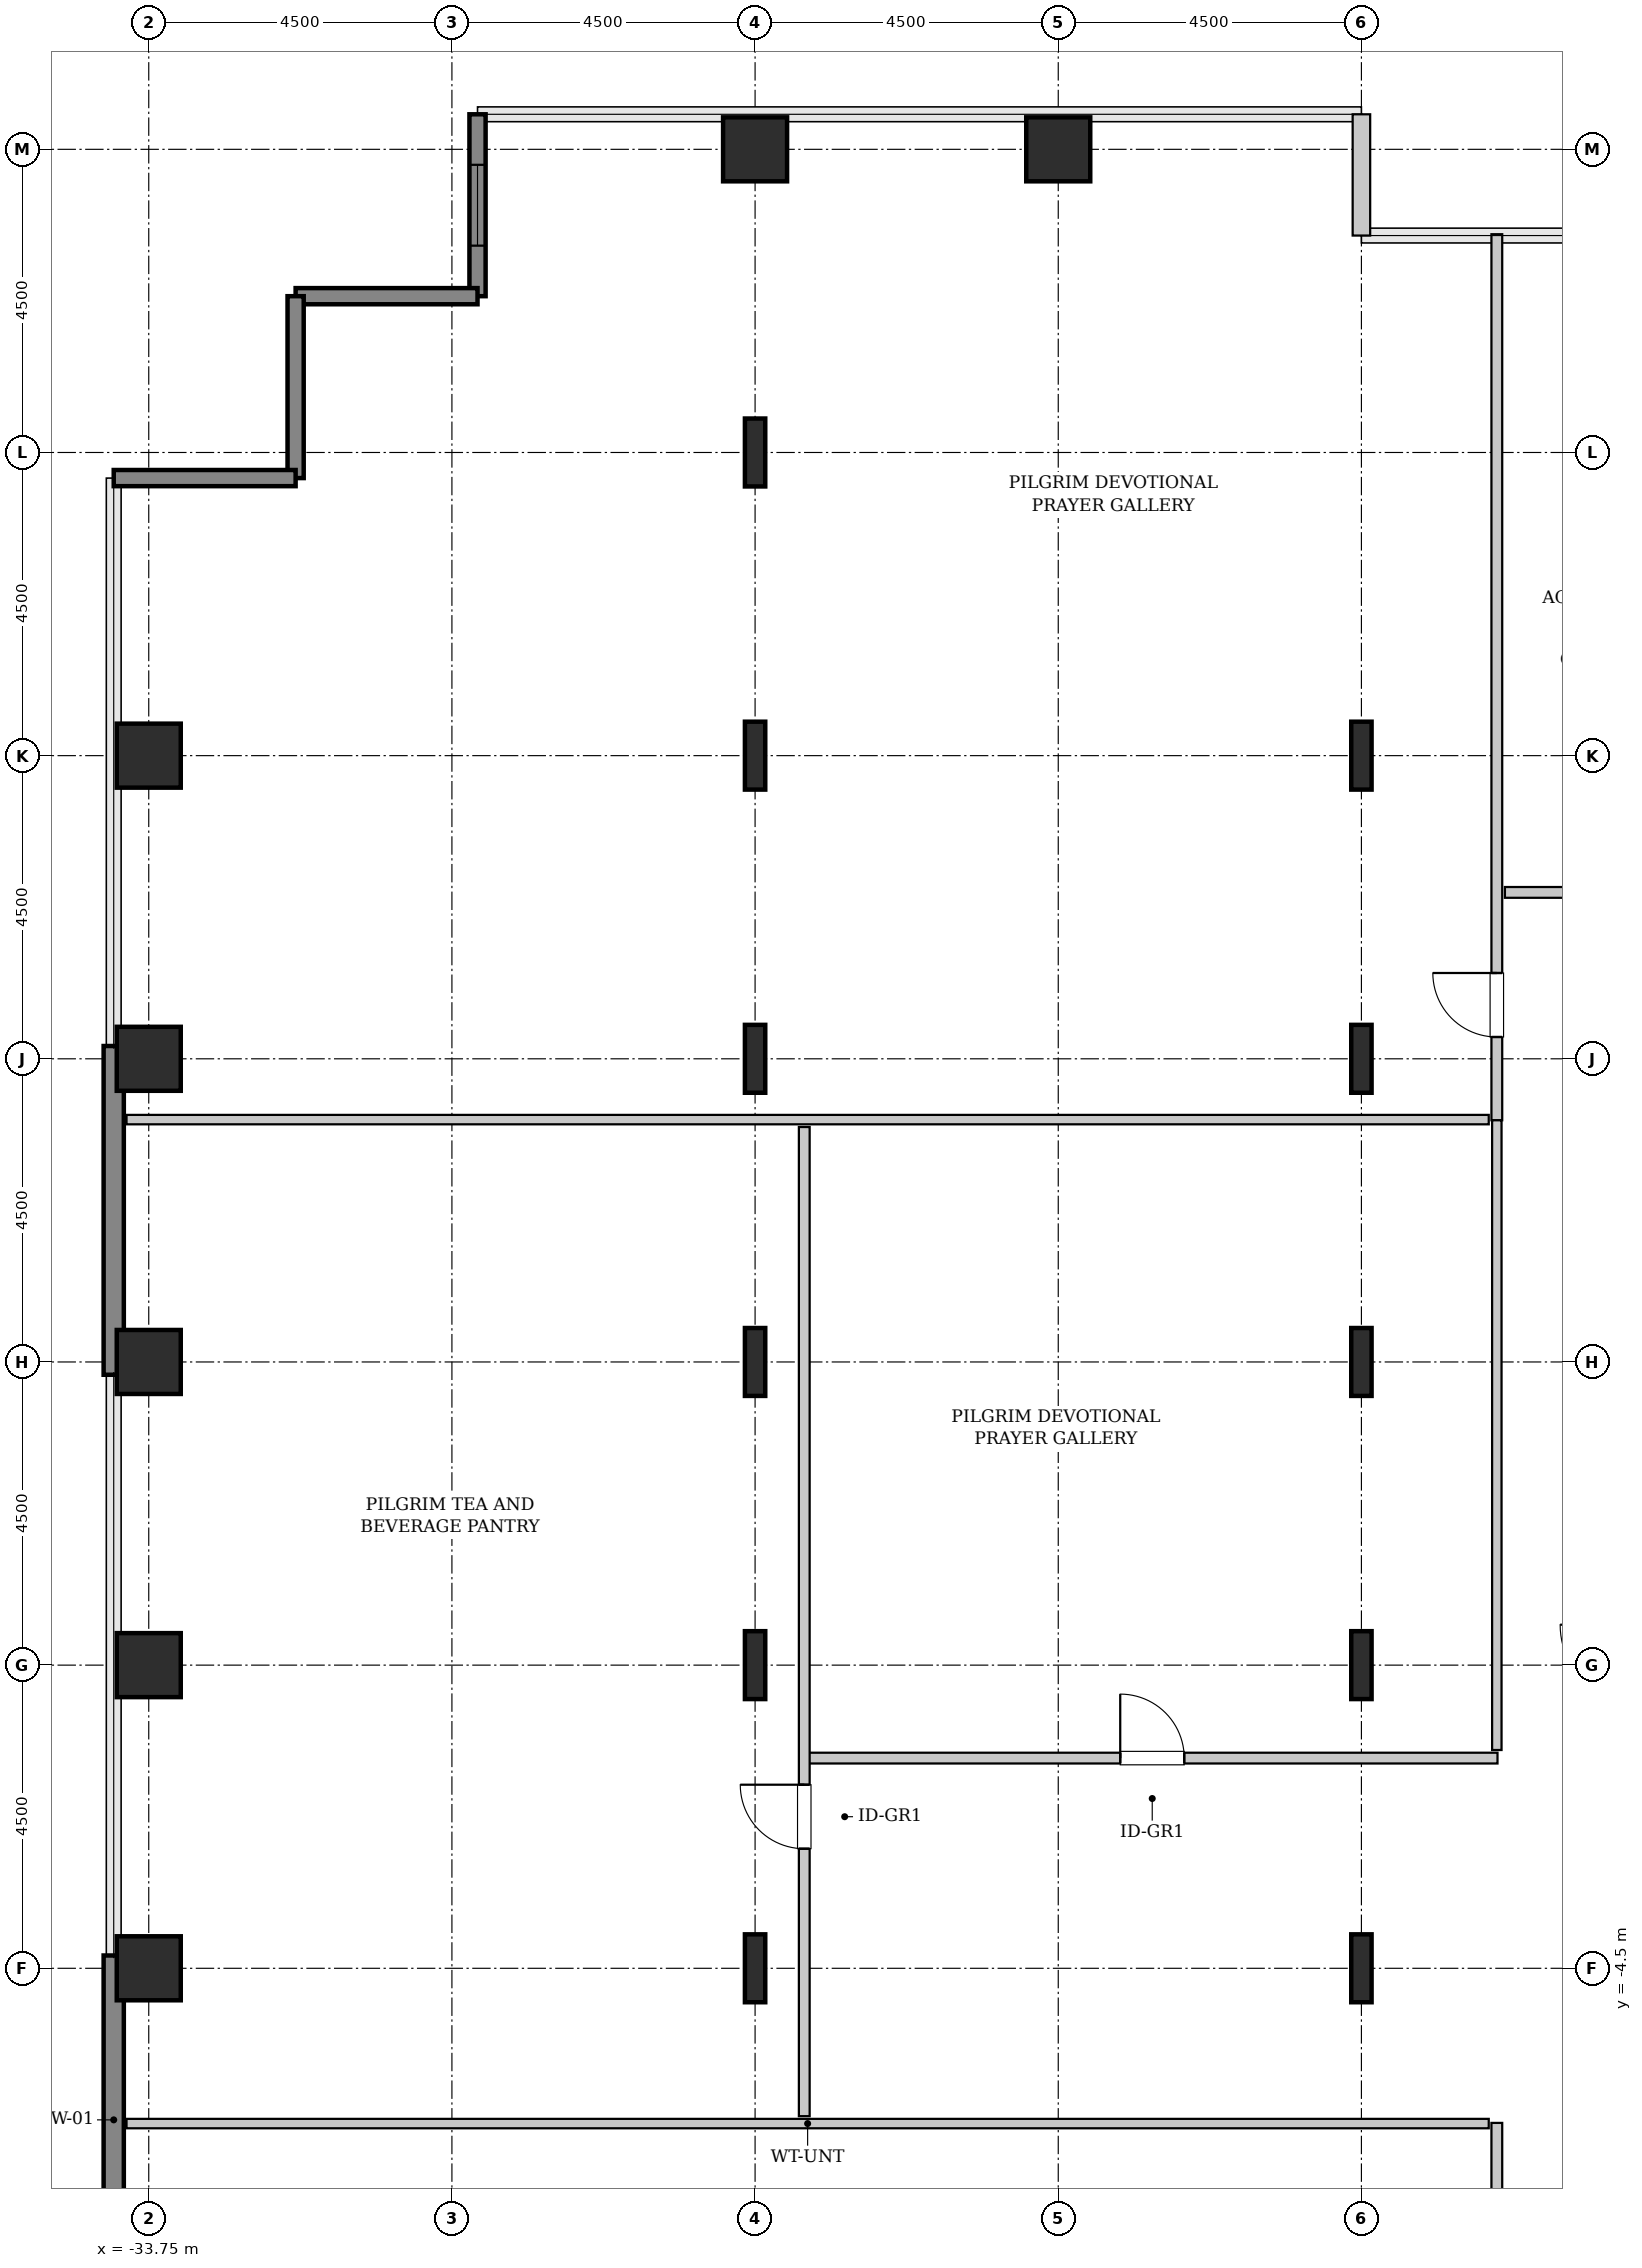
"""IFC4 building model, lengths in metres.
Left out: names, types, materials, properties, quantities, classifications, styles, units other than length and angle.
Written with IfcOpenShell. Run it as: python <this file> out.ifc"""

import sys

from ifc_helpers import new_model, si_unit, direction, frame, frame_2d, origin, origin_2d, place, context, subcontext, project, spatial, rectangle, hollow_rectangle, i_section, extrude, source, transform, mapped, element, fill, save


model = new_model("IFC4")
c1 = context("Model", 3, precision=1e-05, world=origin(), true_north=direction((0.0, 1.0)))
c2 = subcontext(c1, "Body", "Model", "MODEL_VIEW")
j1 = project(units=[si_unit("LENGTHUNIT", "METRE"), si_unit("PLANEANGLEUNIT", "RADIAN")], contexts=[c1])
p1 = place(None, origin())
s1 = spatial("IfcSite", under=j1, at=p1, CompositionType="ELEMENT")
p2 = place(p1, origin())
s2 = spatial("IfcBuilding", under=s1, at=p2, CompositionType="ELEMENT")
p3 = place(p2, frame((0.0, 0.0, 78.6)))
s3 = spatial("IfcBuildingStorey", under=s2, at=p3, CompositionType="ELEMENT", Elevation=78.6)
m1 = source(origin(), c2, "Body", "SweptSolid", [
    extrude(hollow_rectangle(XDim=0.95, YDim=0.95, WallThickness=0.045, InnerFilletRadius=0.045, OuterFilletRadius=0.09, at=origin_2d()), origin(), (0.0, 0.0, 1.0), 3.8),
])
for number, where, z_axis, x_axis in (
    (1, (-33.75, -4.5, 0.0), (0.0, 0.0, 1.0), (1.0, 0.0, 0.0)),
    (2, (-33.75, 0.0, 0.0), (0.0, 0.0, 1.0), (1.0, 0.0, 0.0)),
    (3, (-33.75, 4.5, 0.0), (0.0, 0.0, 1.0), (1.0, 0.0, 0.0)),
    (4, (-33.75, 9.0, 0.0), (0.0, 0.0, 1.0), (1.0, 0.0, 0.0)),
    (5, (-33.75, 13.5, 0.0), (0.0, 0.0, 1.0), (1.0, 0.0, 0.0)),
):
    element("IfcColumn", number, at=place(p3, frame(where, z_axis=z_axis, x_axis=x_axis)), inside=s3, PredefinedType="COLUMN", context=c2, shape_type="MappedRepresentation", body=[
        mapped(m1, transform((0.0, 0.0, 0.0), x_axis=(1.0, 0.0, 0.0), y_axis=(0.0, 1.0, 0.0), z_axis=(0.0, 0.0, 1.0), scale=1.0)),
    ])
m2 = source(origin(), c2, "Body", "SweptSolid", [
    extrude(i_section(OverallWidth=0.302, OverallDepth=1.008, WebThickness=0.021, FlangeThickness=0.04, FilletRadius=0.03, at=origin_2d()), origin(), (0.0, 0.0, 1.0), 3.8),
])
for number, where, z_axis, x_axis in (
    (6, (-24.75, -4.5, 0.0), (0.0, 0.0, 1.0), (1.0, 0.0, 0.0)),
    (7, (-24.75, 0.0, 0.0), (0.0, 0.0, 1.0), (1.0, 0.0, 0.0)),
    (8, (-24.75, 4.5, 0.0), (0.0, 0.0, 1.0), (1.0, 0.0, 0.0)),
    (9, (-24.75, 9.0, 0.0), (0.0, 0.0, 1.0), (1.0, 0.0, 0.0)),
    (10, (-24.75, 13.5, 0.0), (0.0, 0.0, 1.0), (1.0, 0.0, 0.0)),
    (11, (-24.75, 18.0, 0.0), (0.0, 0.0, 1.0), (1.0, 0.0, 0.0)),
):
    element("IfcColumn", number, at=place(p3, frame(where, z_axis=z_axis, x_axis=x_axis)), inside=s3, PredefinedType="COLUMN", context=c2, shape_type="MappedRepresentation", body=[
        mapped(m2, transform((0.0, 0.0, 0.0), x_axis=(1.0, 0.0, 0.0), y_axis=(0.0, 1.0, 0.0), z_axis=(0.0, 0.0, 1.0), scale=1.0)),
    ])
for number, where, z_axis, x_axis in (
    (12, (-24.75, 22.5, 0.0), (0.0, 0.0, 1.0), (1.0, 0.0, 0.0)),
    (13, (-20.25, 22.5, 0.0), (0.0, 0.0, 1.0), (1.0, 0.0, 0.0)),
):
    element("IfcColumn", number, at=place(p3, frame(where, z_axis=z_axis, x_axis=x_axis)), inside=s3, PredefinedType="COLUMN", context=c2, shape_type="MappedRepresentation", body=[
        mapped(m1, transform((0.0, 0.0, 0.0), x_axis=(1.0, 0.0, 0.0), y_axis=(0.0, 1.0, 0.0), z_axis=(0.0, 0.0, 1.0), scale=1.0)),
    ])
for number, where, z_axis, x_axis in (
    (14, (-15.75, -4.5, 0.0), (0.0, 0.0, 1.0), (1.0, 0.0, 0.0)),
    (15, (-15.75, 0.0, 0.0), (0.0, 0.0, 1.0), (1.0, 0.0, 0.0)),
    (16, (-15.75, 4.5, 0.0), (0.0, 0.0, 1.0), (1.0, 0.0, 0.0)),
    (17, (-15.75, 9.0, 0.0), (0.0, 0.0, 1.0), (1.0, 0.0, 0.0)),
    (18, (-15.75, 13.5, 0.0), (0.0, 0.0, 1.0), (1.0, 0.0, 0.0)),
):
    element("IfcColumn", number, at=place(p3, frame(where, z_axis=z_axis, x_axis=x_axis)), inside=s3, PredefinedType="COLUMN", context=c2, shape_type="MappedRepresentation", body=[
        mapped(m2, transform((0.0, 0.0, 0.0), x_axis=(1.0, 0.0, 0.0), y_axis=(0.0, 1.0, 0.0), z_axis=(0.0, 0.0, 1.0), scale=1.0)),
    ])
m3 = source(origin(), c2, "Body", "SweptSolid", [
    extrude(rectangle(XDim=4.88, YDim=0.3, at=frame_2d((2.44, 0.0))), origin(), (0.0, 0.0, 1.0), 3.55),
])
for number, where, z_axis, x_axis in (
    (19, (-34.27, -9.19, 0.0), (0.0, 0.0, 1.0), (0.0, 1.0, 0.0)),
    (20, (-34.27, 4.31, 0.0), (0.0, 0.0, 1.0), (0.0, 1.0, 0.0)),
):
    element("IfcWall", number, at=place(p3, frame(where, z_axis=z_axis, x_axis=x_axis)), inside=s3, PredefinedType="SHEAR", context=c2, shape_type="MappedRepresentation", body=[
        mapped(m3, transform((0.0, 0.0, 0.0), x_axis=(1.0, 0.0, 0.0), y_axis=(0.0, 1.0, 0.0), z_axis=(0.0, 0.0, 1.0), scale=1.0)),
    ])
m4 = source(origin(), c2, "Body", "SweptSolid", [
    extrude(rectangle(XDim=1.8, YDim=0.26, at=frame_2d((0.9, 0.0))), origin(), (0.0, 0.0, 1.0), 3.55),
])
p4 = place(p3, frame((-15.75, 21.22, 0.0), z_axis=(0.0, 0.0, 1.0), x_axis=(0.0, 1.0, 0.0)))
e21 = element("IfcWall", 21, at=p4, inside=s3, PredefinedType="SOLIDWALL", context=c2, shape_type="MappedRepresentation", body=[
    mapped(m4, transform((0.0, 0.0, 0.0), x_axis=(1.0, 0.0, 0.0), y_axis=(0.0, 1.0, 0.0), z_axis=(0.0, 0.0, 1.0), scale=1.0)),
])
m5 = source(origin(), c2, "Body", "SweptSolid", [
    extrude(rectangle(XDim=2.7, YDim=0.24, at=frame_2d((1.35, 0.0))), origin(), (0.0, 0.0, 1.0), 3.55),
])
p5 = place(p3, frame((-28.87, 23.02, 0.0), z_axis=(0.0, 0.0, 1.0), x_axis=(0.0, -1.0, 0.0)))
e22 = element("IfcWall", 22, at=p5, inside=s3, PredefinedType="SHEAR", context=c2, shape_type="MappedRepresentation", body=[
    mapped(m5, transform((0.0, 0.0, 0.0), x_axis=(1.0, 0.0, 0.0), y_axis=(0.0, 1.0, 0.0), z_axis=(0.0, 0.0, 1.0), scale=1.0)),
])
p6 = place(p5, frame((0.75, 0.0, 0.85)))
e23 = element("IfcOpeningElement", 23, at=p6, cuts=e22, PredefinedType="OPENING", context=c2, shape_type="SweptSolid", body=[
    extrude(rectangle(XDim=1.2, YDim=1.8, at=frame_2d((0.6, 0.9))), frame((0.0, 0.13, 0.0), z_axis=(0.0, -1.0, 0.0), x_axis=(1.0, 0.0, 0.0)), (0.0, 0.0, 1.0), 0.26),
])
for number, where, z_axis, x_axis in (
    (24, (-28.87, 20.32, 0.0), (0.0, 0.0, 1.0), (-1.0, 0.0, 0.0)),
    (25, (-31.57, 20.32, 0.0), (0.0, 0.0, 1.0), (0.0, -1.0, 0.0)),
    (26, (-31.57, 17.62, 0.0), (0.0, 0.0, 1.0), (-1.0, 0.0, 0.0)),
):
    element("IfcWall", number, at=place(p3, frame(where, z_axis=z_axis, x_axis=x_axis)), inside=s3, PredefinedType="SHEAR", context=c2, shape_type="MappedRepresentation", body=[
        mapped(m5, transform((0.0, 0.0, 0.0), x_axis=(1.0, 0.0, 0.0), y_axis=(0.0, 1.0, 0.0), z_axis=(0.0, 0.0, 1.0), scale=1.0)),
    ])
m6 = source(origin(), c2, "Body", "SweptSolid", [
    extrude(rectangle(XDim=14.445, YDim=0.16, at=frame_2d((7.223, 0.0))), origin(), (0.0, 0.0, 1.0), 3.535),
])
p7 = place(p3, frame((-13.74, -21.24, 0.0), z_axis=(0.0, 0.0, 1.0), x_axis=(0.0, 1.0, 0.0)))
e27 = element("IfcWall", 27, at=p7, inside=s3, PredefinedType="PARTITIONING", context=c2, shape_type="MappedRepresentation", body=[
    mapped(m6, transform((0.0, 0.0, 0.0), x_axis=(1.0, 0.0, 0.0), y_axis=(0.0, 1.0, 0.0), z_axis=(0.0, 0.0, 1.0), scale=1.0)),
])
p8 = place(p7, frame((11.613, 0.0, 0.0)))
e28 = element("IfcOpeningElement", 28, at=p8, cuts=e27, PredefinedType="OPENING", context=c2, shape_type="SweptSolid", body=[
    extrude(rectangle(XDim=0.95, YDim=2.1, at=frame_2d((0.475, 1.05))), frame((0.0, 0.09, 0.0), z_axis=(0.0, -1.0, 0.0), x_axis=(1.0, 0.0, 0.0)), (0.0, 0.0, 1.0), 0.18),
])
m7 = source(origin(), c2, "Body", "SweptSolid", [
    extrude(rectangle(XDim=20.22, YDim=0.14, at=frame_2d((10.11, 0.0))), origin(), (0.0, 0.0, 1.0), 3.535),
])
p9 = place(p3, frame((-34.08, -6.805, 0.0), z_axis=(0.0, 0.0, 1.0), x_axis=(1.0, 0.0, 0.0)))
e29 = element("IfcWall", 29, at=p9, inside=s3, PredefinedType="PARTITIONING", context=c2, shape_type="MappedRepresentation", body=[
    mapped(m7, transform((0.0, 0.0, 0.0), x_axis=(1.0, 0.0, 0.0), y_axis=(0.0, 1.0, 0.0), z_axis=(0.0, 0.0, 1.0), scale=1.0)),
])
m8 = source(origin(), c2, "Body", "SweptSolid", [
    extrude(rectangle(XDim=13.153, YDim=0.16, at=frame_2d((6.576, 0.0))), origin(), (0.0, 0.0, 1.0), 3.535),
])
p10 = place(p3, frame((-13.74, 8.087, 0.0), z_axis=(0.0, 0.0, 1.0), x_axis=(0.0, 1.0, 0.0)))
e30 = element("IfcWall", 30, at=p10, inside=s3, PredefinedType="PARTITIONING", context=c2, shape_type="MappedRepresentation", body=[
    mapped(m8, transform((0.0, 0.0, 0.0), x_axis=(1.0, 0.0, 0.0), y_axis=(0.0, 1.0, 0.0), z_axis=(0.0, 0.0, 1.0), scale=1.0)),
])
p11 = place(p10, frame((1.236, 0.0, 0.0)))
e31 = element("IfcOpeningElement", 31, at=p11, cuts=e30, PredefinedType="OPENING", context=c2, shape_type="SweptSolid", body=[
    extrude(rectangle(XDim=0.95, YDim=2.1, at=frame_2d((0.475, 1.05))), frame((0.0, 0.09, 0.0), z_axis=(0.0, -1.0, 0.0), x_axis=(1.0, 0.0, 0.0)), (0.0, 0.0, 1.0), 0.18),
])
p12 = place(p3, frame((-34.08, 8.097, 0.0), z_axis=(0.0, 0.0, 1.0), x_axis=(1.0, 0.0, 0.0)))
e32 = element("IfcWall", 32, at=p12, inside=s3, PredefinedType="PARTITIONING", context=c2, shape_type="MappedRepresentation", body=[
    mapped(m7, transform((0.0, 0.0, 0.0), x_axis=(1.0, 0.0, 0.0), y_axis=(0.0, 1.0, 0.0), z_axis=(0.0, 0.0, 1.0), scale=1.0)),
])
m9 = source(origin(), c2, "Body", "SweptSolid", [
    extrude(rectangle(XDim=10.25, YDim=0.16, at=frame_2d((5.125, 0.0))), origin(), (0.0, 0.0, 1.0), 3.535),
])
p13 = place(p3, frame((-23.98, -1.38, 0.0), z_axis=(0.0, 0.0, 1.0), x_axis=(1.0, 0.0, 0.0)))
e33 = element("IfcWall", 33, at=p13, inside=s3, PredefinedType="PARTITIONING", context=c2, shape_type="MappedRepresentation", body=[
    mapped(m9, transform((0.0, 0.0, 0.0), x_axis=(1.0, 0.0, 0.0), y_axis=(0.0, 1.0, 0.0), z_axis=(0.0, 0.0, 1.0), scale=1.0)),
])
p14 = place(p13, frame((4.65, 0.0, 0.0)))
e34 = element("IfcOpeningElement", 34, at=p14, cuts=e33, PredefinedType="OPENING", context=c2, shape_type="SweptSolid", body=[
    extrude(rectangle(XDim=0.95, YDim=2.1, at=frame_2d((0.475, 1.05))), frame((0.0, 0.09, 0.0), z_axis=(0.0, -1.0, 0.0), x_axis=(1.0, 0.0, 0.0)), (0.0, 0.0, 1.0), 0.18),
])
m10 = source(origin(), c2, "Body", "SweptSolid", [
    extrude(rectangle(XDim=9.347, YDim=0.14, at=frame_2d((4.674, 0.0))), origin(), (0.0, 0.0, 1.0), 3.535),
])
p15 = place(p3, frame((-13.74, -1.26, 0.0), z_axis=(0.0, 0.0, 1.0), x_axis=(0.0, 1.0, 0.0)))
e35 = element("IfcWall", 35, at=p15, inside=s3, PredefinedType="PARTITIONING", context=c2, shape_type="MappedRepresentation", body=[
    mapped(m10, transform((0.0, 0.0, 0.0), x_axis=(1.0, 0.0, 0.0), y_axis=(0.0, 1.0, 0.0), z_axis=(0.0, 0.0, 1.0), scale=1.0)),
])
m11 = source(origin(), c2, "Body", "SweptSolid", [
    extrude(rectangle(XDim=14.683, YDim=0.16, at=frame_2d((7.341, 0.0))), origin(), (0.0, 0.0, 1.0), 3.535),
])
p16 = place(p3, frame((-24.02, -6.695, 0.0), z_axis=(0.0, 0.0, 1.0), x_axis=(0.0, 1.0, 0.0)))
e36 = element("IfcWall", 36, at=p16, inside=s3, PredefinedType="PARTITIONING", context=c2, shape_type="MappedRepresentation", body=[
    mapped(m11, transform((0.0, 0.0, 0.0), x_axis=(1.0, 0.0, 0.0), y_axis=(0.0, 1.0, 0.0), z_axis=(0.0, 0.0, 1.0), scale=1.0)),
])
p17 = place(p16, frame((3.97, 0.0, 0.0)))
e37 = element("IfcOpeningElement", 37, at=p17, cuts=e36, PredefinedType="OPENING", context=c2, shape_type="SweptSolid", body=[
    extrude(rectangle(XDim=0.95, YDim=2.1, at=frame_2d((0.475, 1.05))), frame((0.0, 0.09, 0.0), z_axis=(0.0, -1.0, 0.0), x_axis=(1.0, 0.0, 0.0)), (0.0, 0.0, 1.0), 0.18),
])
m12 = source(origin(), c2, "Body", "SweptSolid", [
    extrude(rectangle(XDim=4.125, YDim=0.16, at=frame_2d((2.062, 0.0))), origin(), (0.0, 0.0, 1.0), 3.535),
])
p18 = place(p3, frame((-13.62, 11.47, 0.0), z_axis=(0.0, 0.0, 1.0), x_axis=(1.0, 0.0, 0.0)))
e38 = element("IfcWall", 38, at=p18, inside=s3, PredefinedType="PARTITIONING", context=c2, shape_type="MappedRepresentation", body=[
    mapped(m12, transform((0.0, 0.0, 0.0), x_axis=(1.0, 0.0, 0.0), y_axis=(0.0, 1.0, 0.0), z_axis=(0.0, 0.0, 1.0), scale=1.0)),
])
p19 = place(p18, frame((1.587, 0.0, 0.0)))
e39 = element("IfcOpeningElement", 39, at=p19, cuts=e38, PredefinedType="OPENING", context=c2, shape_type="SweptSolid", body=[
    extrude(rectangle(XDim=0.95, YDim=2.1, at=frame_2d((0.475, 1.05))), frame((0.0, 0.09, 0.0), z_axis=(0.0, -1.0, 0.0), x_axis=(1.0, 0.0, 0.0)), (0.0, 0.0, 1.0), 0.18),
])
m13 = source(origin(), c2, "Body", "SweptSolid", [
    extrude(rectangle(XDim=1.2, YDim=1.8, at=frame_2d((0.6, 0.9))), frame((0.0, 0.03, 0.0), z_axis=(0.0, -1.0, 0.0), x_axis=(1.0, 0.0, 0.0)), (0.0, 0.0, 1.0), 0.06),
])
p20 = place(p6, origin())
e40 = element("IfcWindow", 40, at=p20, inside=s3, PartitioningType="SINGLE_PANEL", PredefinedType="WINDOW", context=c2, shape_type="MappedRepresentation", body=[
    mapped(m13, transform((0.0, 0.0, 0.0), x_axis=(1.0, 0.0, 0.0), y_axis=(0.0, 1.0, 0.0), z_axis=(0.0, 0.0, 1.0), scale=1.0)),
])
fill(e23, e40)
m14 = source(origin(), c2, "Body", "SweptSolid", [
    extrude(rectangle(XDim=0.95, YDim=2.1, at=frame_2d((0.475, 1.05))), frame((0.0, 0.025, 0.0), z_axis=(0.0, -1.0, 0.0), x_axis=(1.0, 0.0, 0.0)), (0.0, 0.0, 1.0), 0.05),
])
p21 = place(p11, origin())
e41 = element("IfcDoor", 41, at=p21, inside=s3, OperationType="SINGLE_SWING_RIGHT", PredefinedType="DOOR", context=c2, shape_type="MappedRepresentation", body=[
    mapped(m14, transform((0.0, 0.0, 0.0), x_axis=(1.0, 0.0, 0.0), y_axis=(0.0, 1.0, 0.0), z_axis=(0.0, 0.0, 1.0), scale=1.0)),
])
fill(e31, e41)
p22 = place(p14, origin())
e42 = element("IfcDoor", 42, at=p22, inside=s3, OperationType="SINGLE_SWING_LEFT", PredefinedType="DOOR", context=c2, shape_type="MappedRepresentation", body=[
    mapped(m14, transform((0.0, 0.0, 0.0), x_axis=(1.0, 0.0, 0.0), y_axis=(0.0, 1.0, 0.0), z_axis=(0.0, 0.0, 1.0), scale=1.0)),
])
fill(e34, e42)
p23 = place(p17, origin())
e43 = element("IfcDoor", 43, at=p23, inside=s3, OperationType="SINGLE_SWING_RIGHT", PredefinedType="DOOR", context=c2, shape_type="MappedRepresentation", body=[
    mapped(m14, transform((0.0, 0.0, 0.0), x_axis=(1.0, 0.0, 0.0), y_axis=(0.0, 1.0, 0.0), z_axis=(0.0, 0.0, 1.0), scale=1.0)),
])
fill(e37, e43)
save(model, sys.argv[1])
